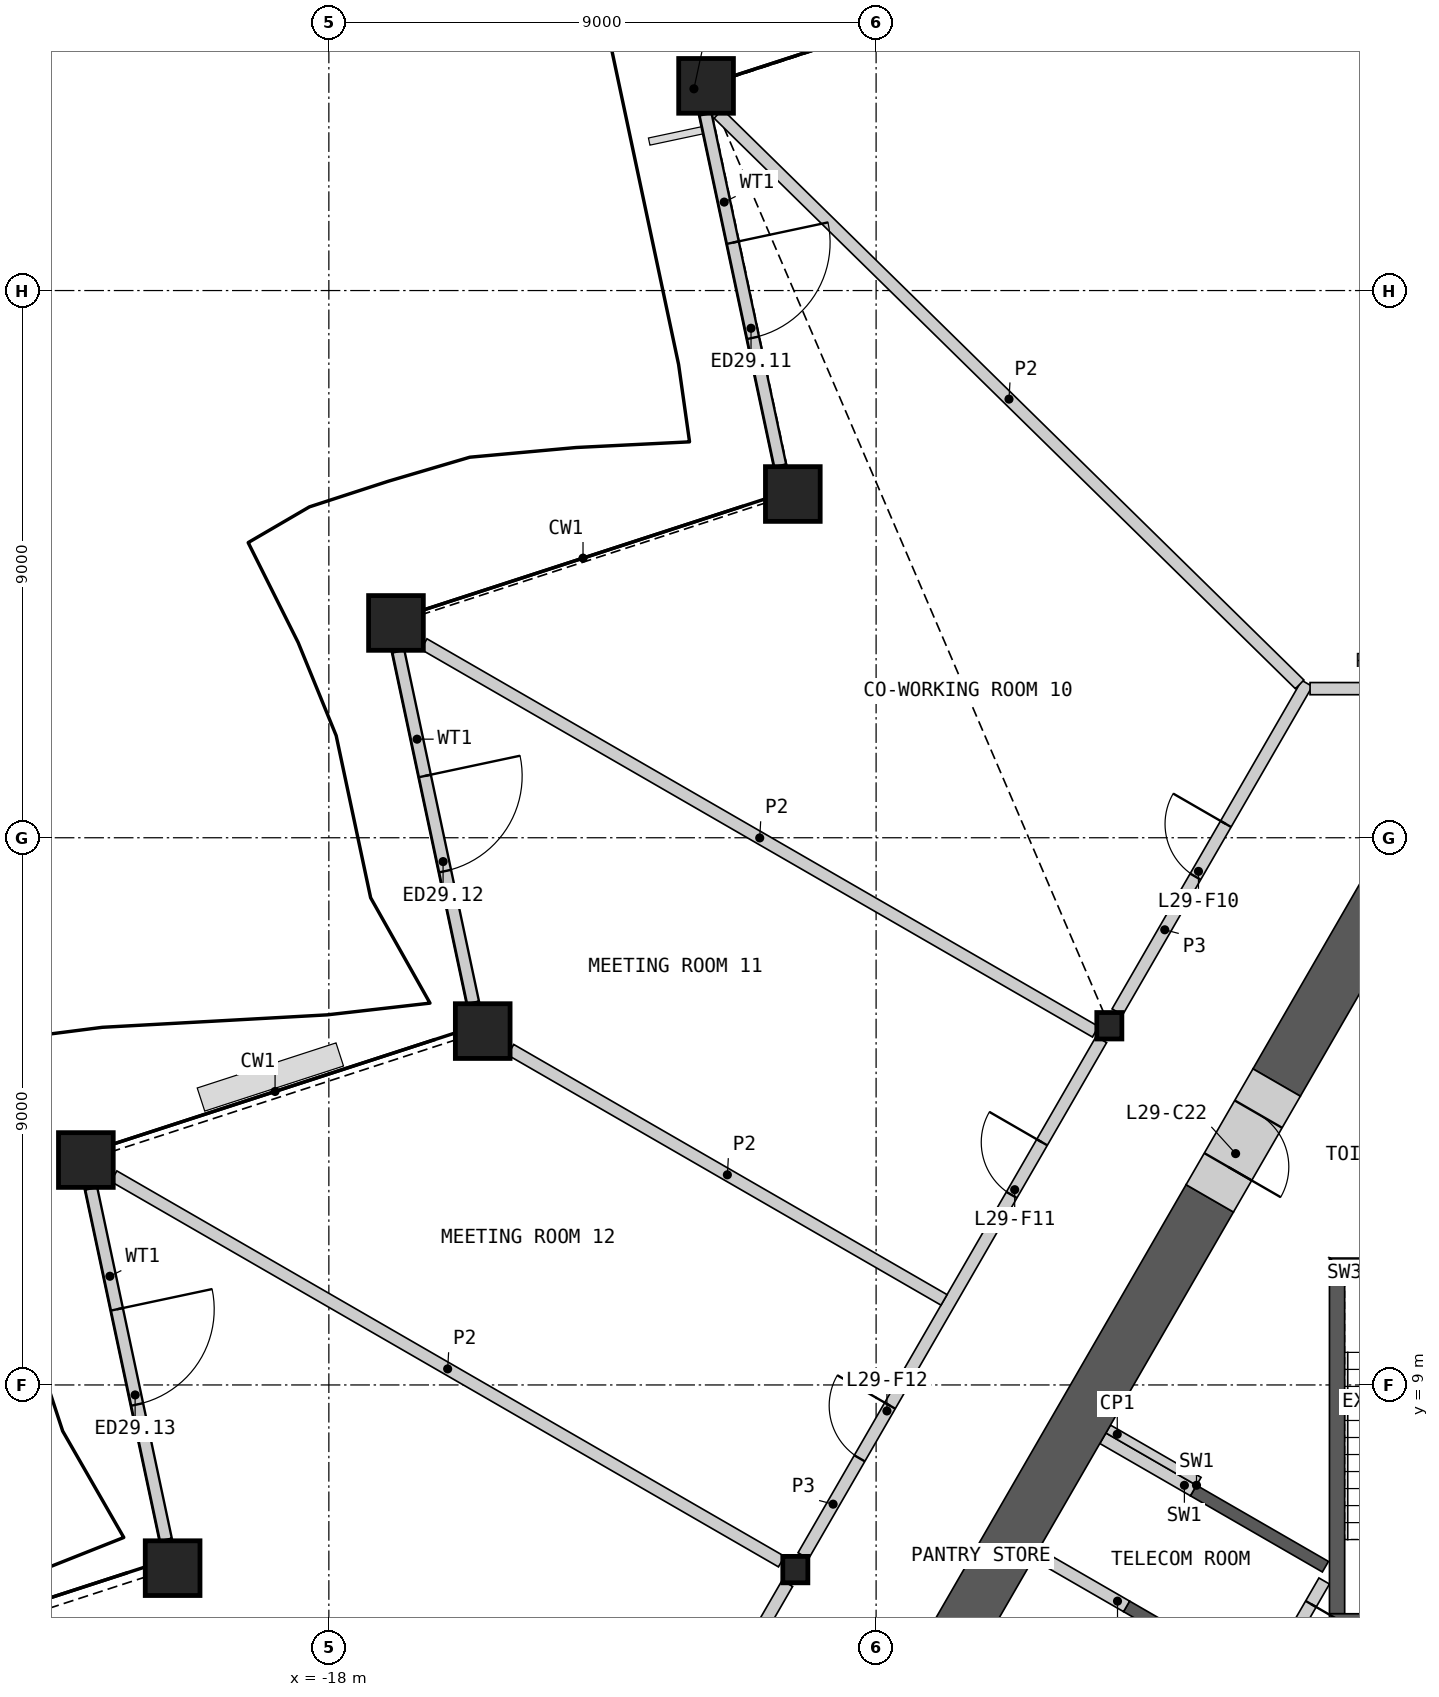
"""IFC4 building model, lengths in metres.
Left out: names, types, materials, properties, quantities, classifications, styles, units other than length and angle.
Written with IfcOpenShell. Run it as: python <this file> out.ifc"""

import sys

from ifc_helpers import new_model, si_unit, direction, frame, frame_2d, origin, origin_2d, place, context, subcontext, project, spatial, polyline, rectangle, hollow_rectangle, i_section, outline, extrude, element, fill, save


model = new_model("IFC4")
c1 = context("Model", 3, precision=1e-05, world=origin(), true_north=direction((0.0, 1.0)))
c2 = subcontext(c1, "Body", "Model", "MODEL_VIEW")
j1 = project(units=[si_unit("LENGTHUNIT", "METRE"), si_unit("PLANEANGLEUNIT", "RADIAN")], contexts=[c1])
p1 = place(None, origin())
s1 = spatial("IfcSite", under=j1, at=p1, CompositionType="ELEMENT")
p2 = place(p1, origin())
s2 = spatial("IfcBuilding", under=s1, at=p2, CompositionType="ELEMENT")
p3 = place(p2, frame((0.0, 0.0, 137.4)))
s3 = spatial("IfcBuildingStorey", under=s2, at=p3, CompositionType="ELEMENT", Elevation=137.4)
for number, where, z_axis, x_axis in (
    (1, (-11.796, 30.366, 0.0), (0.0, 0.0, 1.0), (1.0, 0.0, 0.0)),
    (2, (-10.37, 23.654, 0.0), (0.0, 0.0, 1.0), (1.0, 0.0, 0.0)),
    (3, (-16.896, 21.533, 0.0), (0.0, 0.0, 1.0), (1.0, 0.0, 0.0)),
    (4, (-15.469, 14.82, 0.0), (0.0, 0.0, 1.0), (1.0, 0.0, 0.0)),
    (5, (-21.996, 12.699, 0.0), (0.0, 0.0, 1.0), (1.0, 0.0, 0.0)),
    (6, (-20.57, 5.987, 0.0), (0.0, 0.0, 1.0), (1.0, 0.0, 0.0)),
):
    element("IfcColumn", number, at=place(p3, frame(where, z_axis=z_axis, x_axis=x_axis)), inside=s3, PredefinedType="COLUMN", context=c2, shape_type="SweptSolid", body=[
        extrude(hollow_rectangle(XDim=0.9, YDim=0.9, WallThickness=0.06, at=origin_2d()), origin(), (0.0, 0.0, 1.0), 4.2),
    ])
for number, where, z_axis, x_axis in (
    (7, (-5.164, 14.908, 0.0), (0.0, 0.0, 1.0), (1.0, 0.0, 0.0)),
    (8, (-10.328, 5.963, 0.0), (0.0, 0.0, 1.0), (1.0, 0.0, 0.0)),
):
    element("IfcColumn", number, at=place(p3, frame(where, z_axis=z_axis, x_axis=x_axis)), inside=s3, PredefinedType="COLUMN", context=c2, shape_type="SweptSolid", body=[
        extrude(i_section(OverallWidth=0.412, OverallDepth=0.435, WebThickness=0.036, FlangeThickness=0.057, at=origin_2d()), origin(), (0.0, 0.0, 1.0), 4.2),
    ])
p4 = place(p3, frame((-11.805, 29.9, 0.0), z_axis=(0.0, 0.0, 1.0), x_axis=(0.207917562075, -0.978146352741, 0.0)))
e9 = element("IfcWall", 9, at=p4, inside=s3, PredefinedType="SOLIDWALL", context=c2, shape_type="SweptSolid", body=[
    extrude(rectangle(XDim=5.909, YDim=0.2, at=frame_2d((2.954, 0.0))), origin(), (0.0, 0.0, 1.0), 3.189),
])
p5 = place(p4, frame((2.158, 0.0, 0.0)))
e10 = element("IfcOpeningElement", 10, at=p5, cuts=e9, PredefinedType="OPENING", context=c2, shape_type="SweptSolid", body=[
    extrude(rectangle(XDim=1.6, YDim=2.4, at=frame_2d((0.8, 1.2))), frame((0.0, 0.11, 0.0), z_axis=(0.0, -1.0, 0.0), x_axis=(1.0, 0.0, 0.0)), (0.0, 0.0, 1.0), 0.22),
])
p6 = place(p3, frame((-16.857, 21.066, 0.0), z_axis=(0.0, 0.0, 1.0), x_axis=(0.207917562075, -0.978146352741, 0.0)))
e11 = element("IfcWall", 11, at=p6, inside=s3, PredefinedType="SOLIDWALL", context=c2, shape_type="SweptSolid", body=[
    extrude(rectangle(XDim=5.909, YDim=0.2, at=frame_2d((2.954, 0.0))), origin(), (0.0, 0.0, 1.0), 3.189),
])
p7 = place(p6, frame((2.096, 0.0, 0.0)))
e12 = element("IfcOpeningElement", 12, at=p7, cuts=e11, PredefinedType="OPENING", context=c2, shape_type="SweptSolid", body=[
    extrude(rectangle(XDim=1.6, YDim=2.4, at=frame_2d((0.8, 1.2))), frame((0.0, 0.11, 0.0), z_axis=(0.0, -1.0, 0.0), x_axis=(1.0, 0.0, 0.0)), (0.0, 0.0, 1.0), 0.22),
])
p8 = place(p3, frame((-21.908, 12.233, 0.0), z_axis=(0.0, 0.0, 1.0), x_axis=(0.207886430801, -0.978152969575, 0.0)))
e13 = element("IfcWall", 13, at=p8, inside=s3, PredefinedType="SOLIDWALL", context=c2, shape_type="SweptSolid", body=[
    extrude(rectangle(XDim=5.908, YDim=0.2, at=frame_2d((2.954, 0.0))), origin(), (0.0, 0.0, 1.0), 3.189),
])
p9 = place(p8, frame((2.033, 0.0, 0.0)))
e14 = element("IfcOpeningElement", 14, at=p9, cuts=e13, PredefinedType="OPENING", context=c2, shape_type="SweptSolid", body=[
    extrude(rectangle(XDim=1.6, YDim=2.4, at=frame_2d((0.8, 1.2))), frame((0.0, 0.11, 0.0), z_axis=(0.0, -1.0, 0.0), x_axis=(1.0, 0.0, 0.0)), (0.0, 0.0, 1.0), 0.22),
])
p10 = place(p3, origin())
e15 = element("IfcWall", 15, at=p10, inside=s3, PredefinedType="SHEAR", context=c2, shape_type="SweptSolid", body=[
    extrude(outline(polyline([(-2.76, 4.019), (-4.931, 5.272), (-4.831, 5.445), (-2.66, 4.192), (-2.76, 4.019)])), origin(), (0.0, 0.0, 1.0), 3.8),
])
p11 = place(p3, origin())
e16 = element("IfcWall", 16, at=p11, inside=s3, PredefinedType="SHEAR", context=c2, shape_type="SweptSolid", body=[
    extrude(outline(polyline([(-3.731, 7.35), (-1.561, 6.097), (-1.66, 5.924), (-3.831, 7.177), (-3.731, 7.35)])), origin(), (0.0, 0.0, 1.0), 3.8),
])
p12 = place(p3, frame((-1.631, 5.776, 0.0), z_axis=(0.0, 0.0, 1.0), x_axis=(-0.499992876559, -0.866029516466, 0.0)))
e17 = element("IfcWall", 17, at=p12, inside=s3, PredefinedType="SOLIDWALL", context=c2, shape_type="SweptSolid", body=[
    extrude(rectangle(XDim=6.486, YDim=0.2, at=frame_2d((3.243, 0.0))), origin(), (0.0, 0.0, 1.0), 3.8),
])
p13 = place(p12, frame((0.437, 0.0, 0.0)))
e18 = element("IfcOpeningElement", 18, at=p13, cuts=e17, PredefinedType="OPENING", context=c2, shape_type="SweptSolid", body=[
    extrude(rectangle(XDim=0.9, YDim=2.1, at=frame_2d((0.45, 1.05))), frame((0.0, 0.11, 0.0), z_axis=(0.0, -1.0, 0.0), x_axis=(1.0, 0.0, 0.0)), (0.0, 0.0, 1.0), 0.22),
])
p14 = place(p12, frame((2.637, 0.0, 0.0)))
e19 = element("IfcOpeningElement", 19, at=p14, cuts=e17, PredefinedType="OPENING", context=c2, shape_type="SweptSolid", body=[
    extrude(rectangle(XDim=0.9, YDim=2.1, at=frame_2d((0.45, 1.05))), frame((0.0, 0.11, 0.0), z_axis=(0.0, -1.0, 0.0), x_axis=(1.0, 0.0, 0.0)), (0.0, 0.0, 1.0), 0.22),
])
for number, where, z_axis, x_axis in (
    (20, (-3.781, 7.263, 0.0), (0.0, 0.0, 1.0), (-0.866, 0.5, 0.0)),
    (21, (-4.881, 5.358, 0.0), (0.0, 0.0, 1.0), (-0.866, 0.5, 0.0)),
):
    element("IfcWall", number, at=place(p3, frame(where, z_axis=z_axis, x_axis=x_axis)), inside=s3, PredefinedType="SHEAR", context=c2, shape_type="SweptSolid", body=[
        extrude(rectangle(XDim=1.72, YDim=0.2, at=frame_2d((0.86, 0.0))), origin(), (0.0, 0.0, 1.0), 3.8),
    ])
p15 = place(p3, origin())
e22 = element("IfcWall", 22, at=p15, inside=s3, PredefinedType="SHEAR", context=c2, shape_type="SweptSolid", body=[
    extrude(outline(polyline([(1.544, 11.087), (-1.544, 11.087), (-1.294, 10.837), (1.294, 10.837), (1.544, 11.087)])), origin(), (0.0, 0.0, 1.0), 3.8),
])
p16 = place(p3, origin())
e23 = element("IfcWall", 23, at=p16, inside=s3, PredefinedType="SHEAR", context=c2, shape_type="SweptSolid", body=[
    extrude(outline(polyline([(-1.294, 10.837), (-1.544, 11.087), (-1.544, 5.237), (-1.294, 5.237), (-1.294, 10.837)])), origin(), (0.0, 0.0, 1.0), 3.8),
])
p17 = place(p3, frame((1.544, 5.112, 0.0), z_axis=(0.0, 0.0, 1.0), x_axis=(-1.0, 0.0, 0.0)))
e24 = element("IfcWall", 24, at=p17, inside=s3, PredefinedType="SHEAR", context=c2, shape_type="SweptSolid", body=[
    extrude(rectangle(XDim=3.088, YDim=0.25, at=frame_2d((1.544, 0.0))), origin(), (0.0, 0.0, 1.0), 3.8),
])
p18 = place(p17, frame((0.994, 0.0, 0.0)))
e25 = element("IfcOpeningElement", 25, at=p18, cuts=e24, PredefinedType="OPENING", context=c2, shape_type="SweptSolid", body=[
    extrude(rectangle(XDim=1.1, YDim=2.1, at=frame_2d((0.55, 1.05))), frame((0.0, 0.135, 0.0), z_axis=(0.0, -1.0, 0.0), x_axis=(1.0, 0.0, 0.0)), (0.0, 0.0, 1.0), 0.27),
])
p19 = place(p3, frame((-3.693, 7.415, 0.0), z_axis=(0.0, 0.0, 1.0), x_axis=(-0.866024871741, 0.500000921525, 0.0)))
e26 = element("IfcWall", 26, at=p19, inside=s3, PredefinedType="PARTITIONING", context=c2, shape_type="SweptSolid", body=[
    extrude(rectangle(XDim=1.72, YDim=0.15, at=frame_2d((0.86, 0.0))), origin(), (0.0, 0.0, 1.0), 3.8),
])
p20 = place(p3, frame((-3.512, 12.069, 0.0), z_axis=(0.0, 0.0, 1.0), x_axis=(-0.500002126466, -0.866024176065, 0.0)))
e27 = element("IfcWall", 27, at=p20, inside=s3, PredefinedType="SHEAR", context=c2, shape_type="SweptSolid", body=[
    extrude(rectangle(XDim=8.816, YDim=0.9, at=frame_2d((4.408, 0.0))), origin(), (0.0, 0.0, 1.0), 3.8),
])
p21 = place(p3, frame((-0.39, 17.478, 0.0), z_axis=(0.0, 0.0, 1.0), x_axis=(-0.500046330384, -0.865998653272, 0.0)))
e28 = element("IfcWall", 28, at=p21, inside=s3, PredefinedType="SHEAR", context=c2, shape_type="SweptSolid", body=[
    extrude(rectangle(XDim=4.045, YDim=0.9, at=frame_2d((2.023, 0.0))), origin(), (0.0, 0.0, 1.0), 3.8),
])
p22 = place(p3, frame((-2.413, 13.974, 0.0), z_axis=(0.0, 0.0, 1.0), x_axis=(-0.499946605688, -0.86605622881, 0.0)))
e29 = element("IfcWall", 29, at=p22, inside=s3, PredefinedType="SHEAR", context=c2, shape_type="SweptSolid", body=[
    extrude(rectangle(XDim=2.2, YDim=0.9, at=frame_2d((1.1, 0.0))), origin(), (0.0, 0.0, 1.0), 3.8),
])
p23 = place(p22, frame((0.6, 0.0, 0.0)))
e30 = element("IfcOpeningElement", 30, at=p23, cuts=e29, PredefinedType="OPENING", context=c2, shape_type="SweptSolid", body=[
    extrude(rectangle(XDim=1.0, YDim=2.1, at=frame_2d((0.5, 1.05))), frame((0.0, 0.46, 0.0), z_axis=(0.0, -1.0, 0.0), x_axis=(1.0, 0.0, 0.0)), (0.0, 0.0, 1.0), 0.92),
])
p24 = place(p3, frame((-15.361, -2.754, 0.0), z_axis=(0.0, 0.0, 1.0), x_axis=(0.500004141693, 0.866023012564, 0.0)))
e31 = element("IfcWall", 31, at=p24, inside=s3, PredefinedType="PARTITIONING", context=c2, shape_type="SweptSolid", body=[
    extrude(rectangle(XDim=9.803, YDim=0.2, at=frame_2d((4.902, 0.0))), origin(), (0.0, 0.0, 1.0), 3.8),
])
p25 = place(p24, frame((4.452, 0.0, 0.0)))
e32 = element("IfcOpeningElement", 32, at=p25, cuts=e31, PredefinedType="OPENING", context=c2, shape_type="SweptSolid", body=[
    extrude(rectangle(XDim=1.0, YDim=2.1, at=frame_2d((0.5, 1.05))), frame((0.0, 0.11, 0.0), z_axis=(0.0, -1.0, 0.0), x_axis=(1.0, 0.0, 0.0)), (0.0, 0.0, 1.0), 0.22),
])
p26 = place(p3, frame((-10.197, 6.19, 0.0), z_axis=(0.0, 0.0, 1.0), x_axis=(0.500012035596, 0.866018454918, 0.0)))
e33 = element("IfcWall", 33, at=p26, inside=s3, PredefinedType="PARTITIONING", context=c2, shape_type="SweptSolid", body=[
    extrude(rectangle(XDim=9.803, YDim=0.2, at=frame_2d((4.902, 0.0))), origin(), (0.0, 0.0, 1.0), 3.8),
])
p27 = place(p26, frame((6.853, 0.0, 0.0)))
e34 = element("IfcOpeningElement", 34, at=p27, cuts=e33, PredefinedType="OPENING", context=c2, shape_type="SweptSolid", body=[
    extrude(rectangle(XDim=1.0, YDim=2.1, at=frame_2d((0.5, 1.05))), frame((0.0, 0.11, 0.0), z_axis=(0.0, -1.0, 0.0), x_axis=(1.0, 0.0, 0.0)), (0.0, 0.0, 1.0), 0.22),
])
p28 = place(p26, frame((1.851, 0.0, 0.0)))
e35 = element("IfcOpeningElement", 35, at=p28, cuts=e33, PredefinedType="OPENING", context=c2, shape_type="SweptSolid", body=[
    extrude(rectangle(XDim=1.0, YDim=2.1, at=frame_2d((0.5, 1.05))), frame((0.0, 0.11, 0.0), z_axis=(0.0, -1.0, 0.0), x_axis=(1.0, 0.0, 0.0)), (0.0, 0.0, 1.0), 0.22),
])
p29 = place(p3, frame((-5.033, 15.135, 0.0), z_axis=(0.0, 0.0, 1.0), x_axis=(0.499980978912, 0.866036385336, 0.0)))
e36 = element("IfcWall", 36, at=p29, inside=s3, PredefinedType="PARTITIONING", context=c2, shape_type="SweptSolid", body=[
    extrude(rectangle(XDim=6.24, YDim=0.2, at=frame_2d((3.12, 0.0))), origin(), (0.0, 0.0, 1.0), 3.8),
])
p30 = place(p29, frame((2.57, 0.0, 0.0)))
e37 = element("IfcOpeningElement", 37, at=p30, cuts=e36, PredefinedType="OPENING", context=c2, shape_type="SweptSolid", body=[
    extrude(rectangle(XDim=1.0, YDim=2.1, at=frame_2d((0.5, 1.05))), frame((0.0, 0.11, 0.0), z_axis=(0.0, -1.0, 0.0), x_axis=(1.0, 0.0, 0.0)), (0.0, 0.0, 1.0), 0.22),
])
p31 = place(p3, frame((-1.863, 20.453, 0.0), z_axis=(0.0, 0.0, 1.0), x_axis=(1.0, 0.0, 0.0)))
e38 = element("IfcWall", 38, at=p31, inside=s3, PredefinedType="PARTITIONING", context=c2, shape_type="SweptSolid", body=[
    extrude(rectangle(XDim=3.726, YDim=0.2, at=frame_2d((1.863, 0.0))), origin(), (0.0, 0.0, 1.0), 3.8),
])
p32 = place(p31, frame((1.363, 0.0, 0.0)))
e39 = element("IfcOpeningElement", 39, at=p32, cuts=e38, PredefinedType="OPENING", context=c2, shape_type="SweptSolid", body=[
    extrude(rectangle(XDim=1.0, YDim=2.1, at=frame_2d((0.5, 1.05))), frame((0.0, 0.11, 0.0), z_axis=(0.0, -1.0, 0.0), x_axis=(1.0, 0.0, 0.0)), (0.0, 0.0, 1.0), 0.22),
])
p33 = place(p3, frame((-11.594, 29.906, 0.0), z_axis=(0.0, 0.0, 1.0), x_axis=(0.713664516359, -0.700487657343, 0.0)))
e40 = element("IfcWall", 40, at=p33, inside=s3, PredefinedType="PARTITIONING", context=c2, shape_type="SweptSolid", body=[
    extrude(rectangle(XDim=13.396, YDim=0.2, at=frame_2d((6.698, 0.0))), origin(), (0.0, 0.0, 1.0), 2.885),
])
p34 = place(p3, frame((-16.436, 21.186, 0.0), z_axis=(0.0, 0.0, 1.0), x_axis=(0.866023321739, -0.500003606191, 0.0)))
e41 = element("IfcWall", 41, at=p34, inside=s3, PredefinedType="PARTITIONING", context=c2, shape_type="SweptSolid", body=[
    extrude(rectangle(XDim=12.753, YDim=0.2, at=frame_2d((6.377, 0.0))), origin(), (0.0, 0.0, 1.0), 2.885),
])
p35 = place(p3, frame((-21.536, 12.434, 0.0), z_axis=(0.0, 0.0, 1.0), x_axis=(0.86602461759, -0.500001361726, 0.0)))
e42 = element("IfcWall", 42, at=p35, inside=s3, PredefinedType="PARTITIONING", context=c2, shape_type="SweptSolid", body=[
    extrude(rectangle(XDim=12.679, YDim=0.2, at=frame_2d((6.34, 0.0))), origin(), (0.0, 0.0, 1.0), 2.885),
])
p36 = place(p3, frame((-15.01, 14.514, 0.0), z_axis=(0.0, 0.0, 1.0), x_axis=(0.866018103232, -0.500012644715, 0.0)))
e43 = element("IfcWall", 43, at=p36, inside=s3, PredefinedType="PARTITIONING", context=c2, shape_type="SweptSolid", body=[
    extrude(rectangle(XDim=8.229, YDim=0.2, at=frame_2d((4.115, 0.0))), origin(), (0.0, 0.0, 1.0), 2.885),
])
p37 = place(p5, origin())
e44 = element("IfcDoor", 44, at=p37, inside=s3, OperationType="DOUBLE_DOOR_SINGLE_SWING", PredefinedType="DOOR", context=c2, shape_type="SweptSolid", body=[
    extrude(rectangle(XDim=1.6, YDim=2.4, at=frame_2d((0.8, 1.2))), frame((0.0, 0.025, 0.0), z_axis=(0.0, -1.0, 0.0), x_axis=(1.0, 0.0, 0.0)), (0.0, 0.0, 1.0), 0.05),
])
fill(e10, e44)
p38 = place(p7, origin())
e45 = element("IfcDoor", 45, at=p38, inside=s3, OperationType="DOUBLE_DOOR_SINGLE_SWING", PredefinedType="DOOR", context=c2, shape_type="SweptSolid", body=[
    extrude(rectangle(XDim=1.6, YDim=2.4, at=frame_2d((0.8, 1.2))), frame((0.0, 0.025, 0.0), z_axis=(0.0, -1.0, 0.0), x_axis=(1.0, 0.0, 0.0)), (0.0, 0.0, 1.0), 0.05),
])
fill(e12, e45)
p39 = place(p9, origin())
e46 = element("IfcDoor", 46, at=p39, inside=s3, OperationType="DOUBLE_DOOR_SINGLE_SWING", PredefinedType="DOOR", context=c2, shape_type="SweptSolid", body=[
    extrude(rectangle(XDim=1.6, YDim=2.4, at=frame_2d((0.8, 1.2))), frame((0.0, 0.025, 0.0), z_axis=(0.0, -1.0, 0.0), x_axis=(1.0, 0.0, 0.0)), (0.0, 0.0, 1.0), 0.05),
])
fill(e14, e46)
p40 = place(p13, origin())
e47 = element("IfcDoor", 47, at=p40, inside=s3, OperationType="SINGLE_SWING_LEFT", PredefinedType="DOOR", context=c2, shape_type="SweptSolid", body=[
    extrude(rectangle(XDim=0.9, YDim=2.1, at=frame_2d((0.45, 1.05))), frame((0.0, 0.025, 0.0), z_axis=(0.0, -1.0, 0.0), x_axis=(1.0, 0.0, 0.0)), (0.0, 0.0, 1.0), 0.05),
])
fill(e18, e47)
p41 = place(p23, origin())
e48 = element("IfcDoor", 48, at=p41, inside=s3, OperationType="SINGLE_SWING_RIGHT", PredefinedType="DOOR", context=c2, shape_type="SweptSolid", body=[
    extrude(rectangle(XDim=1.0, YDim=2.1, at=frame_2d((0.5, 1.05))), frame((0.0, 0.205, 0.0), z_axis=(0.0, -1.0, 0.0), x_axis=(1.0, 0.0, 0.0)), (0.0, 0.0, 1.0), 0.05),
])
fill(e30, e48)
p42 = place(p30, origin())
e49 = element("IfcDoor", 49, at=p42, inside=s3, OperationType="SINGLE_SWING_RIGHT", PredefinedType="DOOR", context=c2, shape_type="SweptSolid", body=[
    extrude(rectangle(XDim=1.0, YDim=2.1, at=frame_2d((0.5, 1.05))), frame((0.0, 0.025, 0.0), z_axis=(0.0, -1.0, 0.0), x_axis=(1.0, 0.0, 0.0)), (0.0, 0.0, 1.0), 0.05),
])
fill(e37, e49)
p43 = place(p27, origin())
e50 = element("IfcDoor", 50, at=p43, inside=s3, OperationType="SINGLE_SWING_RIGHT", PredefinedType="DOOR", context=c2, shape_type="SweptSolid", body=[
    extrude(rectangle(XDim=1.0, YDim=2.1, at=frame_2d((0.5, 1.05))), frame((0.0, 0.025, 0.0), z_axis=(0.0, -1.0, 0.0), x_axis=(1.0, 0.0, 0.0)), (0.0, 0.0, 1.0), 0.05),
])
fill(e34, e50)
p44 = place(p28, origin())
e51 = element("IfcDoor", 51, at=p44, inside=s3, OperationType="SINGLE_SWING_RIGHT", PredefinedType="DOOR", context=c2, shape_type="SweptSolid", body=[
    extrude(rectangle(XDim=1.0, YDim=2.1, at=frame_2d((0.5, 1.05))), frame((0.0, 0.025, 0.0), z_axis=(0.0, -1.0, 0.0), x_axis=(1.0, 0.0, 0.0)), (0.0, 0.0, 1.0), 0.05),
])
fill(e35, e51)
save(model, sys.argv[1])
